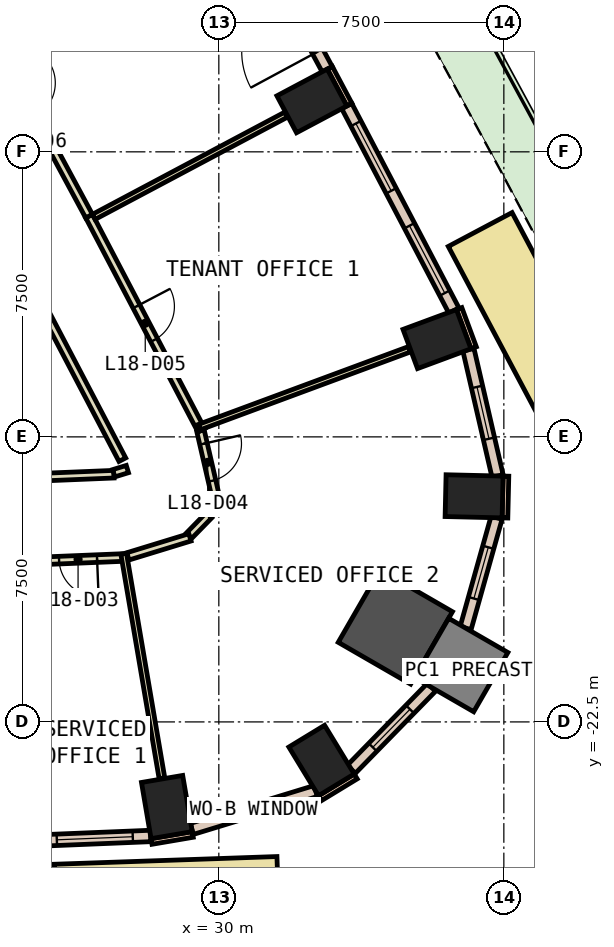
"""IFC4 building model, lengths in metres.
Left out: names, types, materials, properties, quantities, classifications, styles, units other than length and angle.
Written with IfcOpenShell. Run it as: python <this file> out.ifc"""

import sys

from ifc_helpers import new_model, si_unit, direction, frame, frame_2d, origin, origin_2d, place, context, subcontext, project, spatial, rectangle, extrude, element, fill, save


model = new_model("IFC4")
c1 = context("Model", 3, precision=1e-05, world=origin(), true_north=direction((0.0, 1.0)))
c2 = subcontext(c1, "Body", "Model", "MODEL_VIEW")
j1 = project(units=[si_unit("LENGTHUNIT", "METRE"), si_unit("PLANEANGLEUNIT", "RADIAN")], contexts=[c1])
p1 = place(None, origin())
s1 = spatial("IfcSite", under=j1, at=p1, CompositionType="ELEMENT")
p2 = place(p1, origin())
s2 = spatial("IfcBuilding", under=s1, at=p2, CompositionType="ELEMENT")
p3 = place(p2, frame((0.0, 0.0, 86.6)))
s3 = spatial("IfcBuildingStorey", under=s2, at=p3, CompositionType="ELEMENT", Elevation=86.6)
for number, where, z_axis, x_axis in (
    (1, (28.633, -24.74, 0.0), (0.0, 0.0, 1.0), (0.986, 0.168, 0.0)),
    (2, (32.703, -23.516, 0.0), (0.0, 0.0, 1.0), (0.854, 0.52, 0.0)),
):
    element("IfcColumn", number, at=place(p3, frame(where, z_axis=z_axis, x_axis=x_axis)), inside=s3, PredefinedType="COLUMN", context=c2, shape_type="SweptSolid", body=[
        extrude(rectangle(XDim=1.1, YDim=1.5, at=origin_2d()), origin(), (0.0, 0.0, 1.0), 3.8),
    ])
p4 = place(p3, frame((34.645, -20.003, 0.0), z_axis=(0.0, 0.0, 1.0), x_axis=(-0.866025403784, 0.5, 0.0)))
e3 = element("IfcColumn", 3, at=p4, inside=s3, PredefinedType="COLUMN", context=c2, shape_type="SweptSolid", body=[
    extrude(rectangle(XDim=2.2, YDim=2.2, at=origin_2d()), origin(), (0.0, 0.0, 1.0), 3.8),
])
for number, where, z_axis, x_axis in (
    (4, (36.717, -16.564, 0.0), (0.0, 0.0, 1.0), (0.023, 1.0, 0.0)),
    (5, (35.741, -12.427, 0.0), (0.0, 0.0, 1.0), (-0.347, 0.938, 0.0)),
    (6, (32.449, -6.16, 0.0), (0.0, 0.0, 1.0), (-0.469, 0.883, 0.0)),
):
    element("IfcColumn", number, at=place(p3, frame(where, z_axis=z_axis, x_axis=x_axis)), inside=s3, PredefinedType="COLUMN", context=c2, shape_type="SweptSolid", body=[
        extrude(rectangle(XDim=1.1, YDim=1.5, at=origin_2d()), origin(), (0.0, 0.0, 1.0), 3.8),
    ])
p5 = place(p3, frame((36.377, -21.003, 0.0), z_axis=(0.0, 0.0, 1.0), x_axis=(-0.866025403784, 0.5, 0.0)))
e7 = element("IfcColumn", 7, at=p5, inside=s3, PredefinedType="COLUMN", context=c2, shape_type="SweptSolid", body=[
    extrude(rectangle(XDim=1.8, YDim=1.8, at=origin_2d()), origin(), (0.0, 0.0, 1.0), 3.8),
])
p6 = place(p3, frame((36.706, -12.656, 0.0), z_axis=(0.0, 0.0, 1.0), x_axis=(-0.347205967468, 0.937788897436, 0.0)))
e8 = element("IfcWall", 8, at=p6, inside=s3, PredefinedType="STANDARD", context=c2, shape_type="SweptSolid", body=[
    extrude(rectangle(XDim=1.1, YDim=0.15, at=frame_2d((0.55, 0.0))), origin(), (0.0, 0.0, 1.0), 3.8),
])
p7 = place(p3, frame((33.436, -6.259, 0.0), z_axis=(0.0, 0.0, 1.0), x_axis=(-0.469366248657, 0.883003581319, 0.0)))
e9 = element("IfcWall", 9, at=p7, inside=s3, PredefinedType="STANDARD", context=c2, shape_type="SweptSolid", body=[
    extrude(rectangle(XDim=1.1, YDim=0.15, at=frame_2d((0.55, 0.0))), origin(), (0.0, 0.0, 1.0), 3.8),
])
p8 = place(p3, frame((28.229, -25.646, 0.0), z_axis=(0.0, 0.0, 1.0), x_axis=(0.985763338892, 0.168138751323, 0.0)))
e10 = element("IfcWall", 10, at=p8, inside=s3, PredefinedType="STANDARD", context=c2, shape_type="SweptSolid", body=[
    extrude(rectangle(XDim=1.101, YDim=0.15, at=frame_2d((0.55, 0.0))), origin(), (0.0, 0.0, 1.0), 3.8),
])
for number, where, z_axis, x_axis in (
    (11, (32.662, -24.507, 0.0), (0.0, 0.0, 1.0), (0.854, 0.52, 0.0)),
    (12, (37.529, -17.133, 0.0), (0.0, 0.0, 1.0), (0.024, 1.0, 0.0)),
):
    element("IfcWall", number, at=place(p3, frame(where, z_axis=z_axis, x_axis=x_axis)), inside=s3, PredefinedType="STANDARD", context=c2, shape_type="SweptSolid", body=[
        extrude(rectangle(XDim=1.1, YDim=0.15, at=frame_2d((0.55, 0.0))), origin(), (0.0, 0.0, 1.0), 3.8),
    ])
p9 = place(p3, frame((22.332, -25.742, 0.0), z_axis=(0.0, 0.0, 1.0), x_axis=(0.999159360905, 0.040994774244, 0.0)))
e13 = element("IfcWall", 13, at=p9, inside=s3, PredefinedType="STANDARD", context=c2, shape_type="SweptSolid", body=[
    extrude(rectangle(XDim=5.878, YDim=0.3, at=frame_2d((2.939, 0.0))), origin(), (0.0, 0.0, 1.0), 3.8),
])
p10 = place(p9, frame((0.469, 0.0, 0.9)))
e14 = element("IfcOpeningElement", 14, at=p10, cuts=e13, PredefinedType="OPENING", context=c2, shape_type="SweptSolid", body=[
    extrude(rectangle(XDim=2.0, YDim=2.6, at=frame_2d((1.0, 1.3))), frame((0.0, 0.16, 0.0), z_axis=(0.0, -1.0, 0.0), x_axis=(1.0, 0.0, 0.0)), (0.0, 0.0, 1.0), 0.32),
])
p11 = place(p9, frame((3.408, 0.0, 0.9)))
e15 = element("IfcOpeningElement", 15, at=p11, cuts=e13, PredefinedType="OPENING", context=c2, shape_type="SweptSolid", body=[
    extrude(rectangle(XDim=2.0, YDim=2.6, at=frame_2d((1.0, 1.3))), frame((0.0, 0.16, 0.0), z_axis=(0.0, -1.0, 0.0), x_axis=(1.0, 0.0, 0.0)), (0.0, 0.0, 1.0), 0.32),
])
p12 = place(p3, frame((29.288, -25.316, 0.0), z_axis=(0.0, 0.0, 1.0), x_axis=(0.956317661006, 0.292329490895, 0.0)))
e16 = element("IfcWall", 16, at=p12, inside=s3, PredefinedType="STANDARD", context=c2, shape_type="SweptSolid", body=[
    extrude(rectangle(XDim=3.41, YDim=0.3, at=frame_2d((1.705, 0.0))), origin(), (0.0, 0.0, 1.0), 3.8),
])
p13 = place(p12, frame((1.005, 0.0, 0.9)))
e17 = element("IfcOpeningElement", 17, at=p13, cuts=e16, PredefinedType="OPENING", context=c2, shape_type="SweptSolid", body=[
    extrude(rectangle(XDim=1.4, YDim=2.6, at=frame_2d((0.7, 1.3))), frame((0.0, 0.16, 0.0), z_axis=(0.0, -1.0, 0.0), x_axis=(1.0, 0.0, 0.0)), (0.0, 0.0, 1.0), 0.32),
])
p14 = place(p3, frame((33.486, -23.747, 0.0), z_axis=(0.0, 0.0, 1.0), x_axis=(0.698928244773, 0.715191798512, 0.0)))
e18 = element("IfcWall", 18, at=p14, inside=s3, PredefinedType="STANDARD", context=c2, shape_type="SweptSolid", body=[
    extrude(rectangle(XDim=3.017, YDim=0.3, at=frame_2d((1.509, 0.0))), origin(), (0.0, 0.0, 1.0), 3.8),
])
p15 = place(p14, frame((0.809, 0.0, 0.9)))
e19 = element("IfcOpeningElement", 19, at=p15, cuts=e18, PredefinedType="OPENING", context=c2, shape_type="SweptSolid", body=[
    extrude(rectangle(XDim=1.4, YDim=2.6, at=frame_2d((0.7, 1.3))), frame((0.0, 0.16, 0.0), z_axis=(0.0, -1.0, 0.0), x_axis=(1.0, 0.0, 0.0)), (0.0, 0.0, 1.0), 0.32),
])
p16 = place(p3, frame((36.494, -20.032, 0.0), z_axis=(0.0, 0.0, 1.0), x_axis=(0.270176120308, 0.962810918102, 0.0)))
e20 = element("IfcWall", 20, at=p16, inside=s3, PredefinedType="STANDARD", context=c2, shape_type="SweptSolid", body=[
    extrude(rectangle(XDim=3.017, YDim=0.3, at=frame_2d((1.509, 0.0))), origin(), (0.0, 0.0, 1.0), 3.8),
])
p17 = place(p16, frame((0.809, 0.0, 0.9)))
e21 = element("IfcOpeningElement", 21, at=p17, cuts=e20, PredefinedType="OPENING", context=c2, shape_type="SweptSolid", body=[
    extrude(rectangle(XDim=1.4, YDim=2.6, at=frame_2d((0.7, 1.3))), frame((0.0, 0.16, 0.0), z_axis=(0.0, -1.0, 0.0), x_axis=(1.0, 0.0, 0.0)), (0.0, 0.0, 1.0), 0.32),
])
p18 = place(p3, frame((37.335, -16.029, 0.0), z_axis=(0.0, 0.0, 1.0), x_axis=(-0.224859506699, 0.974391195695, 0.0)))
e22 = element("IfcWall", 22, at=p18, inside=s3, PredefinedType="STANDARD", context=c2, shape_type="SweptSolid", body=[
    extrude(rectangle(XDim=3.41, YDim=0.3, at=frame_2d((1.705, 0.0))), origin(), (0.0, 0.0, 1.0), 3.8),
])
p19 = place(p18, frame((1.005, 0.0, 0.9)))
e23 = element("IfcOpeningElement", 23, at=p19, cuts=e22, PredefinedType="OPENING", context=c2, shape_type="SweptSolid", body=[
    extrude(rectangle(XDim=1.4, YDim=2.6, at=frame_2d((0.7, 1.3))), frame((0.0, 0.16, 0.0), z_axis=(0.0, -1.0, 0.0), x_axis=(1.0, 0.0, 0.0)), (0.0, 0.0, 1.0), 0.32),
])
p20 = place(p3, frame((36.186, -11.676, 0.0), z_axis=(0.0, 0.0, 1.0), x_axis=(-0.464187178015, 0.885737130173, 0.0)))
e24 = element("IfcWall", 24, at=p20, inside=s3, PredefinedType="STANDARD", context=c2, shape_type="SweptSolid", body=[
    extrude(rectangle(XDim=6.075, YDim=0.3, at=frame_2d((3.038, 0.0))), origin(), (0.0, 0.0, 1.0), 3.8),
])
p21 = place(p20, frame((0.519, 0.0, 0.9)))
e25 = element("IfcOpeningElement", 25, at=p21, cuts=e24, PredefinedType="OPENING", context=c2, shape_type="SweptSolid", body=[
    extrude(rectangle(XDim=2.0, YDim=2.6, at=frame_2d((1.0, 1.3))), frame((0.0, 0.16, 0.0), z_axis=(0.0, -1.0, 0.0), x_axis=(1.0, 0.0, 0.0)), (0.0, 0.0, 1.0), 0.32),
])
p22 = place(p20, frame((3.556, 0.0, 0.9)))
e26 = element("IfcOpeningElement", 26, at=p22, cuts=e24, PredefinedType="OPENING", context=c2, shape_type="SweptSolid", body=[
    extrude(rectangle(XDim=2.0, YDim=2.6, at=frame_2d((1.0, 1.3))), frame((0.0, 0.16, 0.0), z_axis=(0.0, -1.0, 0.0), x_axis=(1.0, 0.0, 0.0)), (0.0, 0.0, 1.0), 0.32),
])
p23 = place(p3, frame((32.851, -5.325, 0.0), z_axis=(0.0, 0.0, 1.0), x_axis=(-0.474369552216, 0.880325807829, 0.0)))
e27 = element("IfcWall", 27, at=p23, inside=s3, PredefinedType="STANDARD", context=c2, shape_type="SweptSolid", body=[
    extrude(rectangle(XDim=6.099, YDim=0.3, at=frame_2d((3.049, 0.0))), origin(), (0.0, 0.0, 1.0), 3.8),
])
p24 = place(p23, frame((0.525, 0.0, 0.0)))
e28 = element("IfcOpeningElement", 28, at=p24, cuts=e27, PredefinedType="OPENING", context=c2, shape_type="SweptSolid", body=[
    extrude(rectangle(XDim=2.0, YDim=2.4, at=frame_2d((1.0, 1.2))), frame((0.0, 0.16, 0.0), z_axis=(0.0, -1.0, 0.0), x_axis=(1.0, 0.0, 0.0)), (0.0, 0.0, 1.0), 0.32),
])
p25 = place(p23, frame((3.574, 0.0, 0.9)))
e29 = element("IfcOpeningElement", 29, at=p25, cuts=e27, PredefinedType="OPENING", context=c2, shape_type="SweptSolid", body=[
    extrude(rectangle(XDim=2.0, YDim=2.6, at=frame_2d((1.0, 1.3))), frame((0.0, 0.16, 0.0), z_axis=(0.0, -1.0, 0.0), x_axis=(1.0, 0.0, 0.0)), (0.0, 0.0, 1.0), 0.32),
])
p26 = place(p3, frame((25.702, -27.195, 0.0), z_axis=(0.0, 0.0, 1.0), x_axis=(0.999399802094, 0.034641529615, 0.0)))
e30 = element("IfcWall", 30, at=p26, inside=s3, PredefinedType="STANDARD", context=c2, shape_type="SweptSolid", body=[
    extrude(rectangle(XDim=5.864, YDim=1.9, at=frame_2d((2.932, 0.0))), origin(), (0.0, 0.0, 1.0), 0.8),
])
p27 = place(p3, frame((39.362, -14.224, 0.0), z_axis=(0.0, 0.0, 1.0), x_axis=(-0.468973311577, 0.883212337453, 0.0)))
e31 = element("IfcWall", 31, at=p27, inside=s3, PredefinedType="STANDARD", context=c2, shape_type="SweptSolid", body=[
    extrude(rectangle(XDim=5.299, YDim=1.9, at=frame_2d((2.649, 0.0))), origin(), (0.0, 0.0, 1.0), 0.8),
])
p28 = place(p3, frame((21.446, -16.22, 0.0), z_axis=(0.0, 0.0, 1.0), x_axis=(0.999157128819, 0.041049140426, 0.0)))
e32 = element("IfcWall", 32, at=p28, inside=s3, PredefinedType="PARTITIONING", context=c2, shape_type="SweptSolid", body=[
    extrude(rectangle(XDim=5.799, YDim=0.2, at=frame_2d((2.899, 0.0))), origin(), (0.0, 0.0, 1.0), 3.8),
])
p29 = place(p3, frame((27.235, -15.957, 0.0), z_axis=(0.0, 0.0, 1.0), x_axis=(0.956017741345, 0.293308844453, 0.0)))
e33 = element("IfcWall", 33, at=p29, inside=s3, PredefinedType="PARTITIONING", context=c2, shape_type="SweptSolid", body=[
    extrude(rectangle(XDim=0.375, YDim=0.2, at=frame_2d((0.188, 0.0))), origin(), (0.0, 0.0, 1.0), 3.8),
])
p30 = place(p3, frame((27.461, -15.6, 0.0), z_axis=(0.0, 0.0, 1.0), x_axis=(-0.464203280494, 0.885728691179, 0.0)))
e34 = element("IfcWall", 34, at=p30, inside=s3, PredefinedType="PARTITIONING", context=c2, shape_type="SweptSolid", body=[
    extrude(rectangle(XDim=5.995, YDim=0.2, at=frame_2d((2.998, 0.0))), origin(), (0.0, 0.0, 1.0), 3.8),
])
p31 = place(p3, frame((27.538, -18.172, 0.0), z_axis=(0.0, 0.0, 1.0), x_axis=(-0.999161261417, -0.040948427126, 0.0)))
e35 = element("IfcWall", 35, at=p31, inside=s3, PredefinedType="PARTITIONING", context=c2, shape_type="SweptSolid", body=[
    extrude(rectangle(XDim=2.486, YDim=0.2, at=frame_2d((1.243, 0.0))), origin(), (0.0, 0.0, 1.0), 3.8),
])
p32 = place(p31, frame((0.743, 0.0, 0.0)))
e36 = element("IfcOpeningElement", 36, at=p32, cuts=e35, PredefinedType="OPENING", context=c2, shape_type="SweptSolid", body=[
    extrude(rectangle(XDim=1.0, YDim=2.1, at=frame_2d((0.5, 1.05))), frame((0.0, 0.11, 0.0), z_axis=(0.0, -1.0, 0.0), x_axis=(1.0, 0.0, 0.0)), (0.0, 0.0, 1.0), 0.22),
])
p33 = place(p3, frame((29.517, -14.838, 0.0), z_axis=(0.0, 0.0, 1.0), x_axis=(0.224316169854, -0.974516421587, 0.0)))
e37 = element("IfcWall", 37, at=p33, inside=s3, PredefinedType="PARTITIONING", context=c2, shape_type="SweptSolid", body=[
    extrude(rectangle(XDim=1.707, YDim=0.2, at=frame_2d((0.853, 0.0))), origin(), (0.0, 0.0, 1.0), 3.8),
])
p34 = place(p33, frame((0.353, 0.0, 0.0)))
e38 = element("IfcOpeningElement", 38, at=p34, cuts=e37, PredefinedType="OPENING", context=c2, shape_type="SweptSolid", body=[
    extrude(rectangle(XDim=1.0, YDim=2.1, at=frame_2d((0.5, 1.05))), frame((0.0, 0.11, 0.0), z_axis=(0.0, -1.0, 0.0), x_axis=(1.0, 0.0, 0.0)), (0.0, 0.0, 1.0), 0.22),
])
p35 = place(p3, frame((29.851, -16.5, 0.0), z_axis=(0.0, 0.0, 1.0), x_axis=(-0.269792639482, -0.962918444979, 0.0)))
e39 = element("IfcWall", 39, at=p35, inside=s3, PredefinedType="PARTITIONING", context=c2, shape_type="SweptSolid", body=[
    extrude(rectangle(XDim=0.557, YDim=0.2, at=frame_2d((0.278, 0.0))), origin(), (0.0, 0.0, 1.0), 3.8),
])
p36 = place(p3, frame((29.743, -17.061, 0.0), z_axis=(0.0, 0.0, 1.0), x_axis=(-0.698331924638, -0.715774072617, 0.0)))
e40 = element("IfcWall", 40, at=p36, inside=s3, PredefinedType="PARTITIONING", context=c2, shape_type="SweptSolid", body=[
    extrude(rectangle(XDim=0.756, YDim=0.2, at=frame_2d((0.378, 0.0))), origin(), (0.0, 0.0, 1.0), 3.8),
])
p37 = place(p3, frame((29.24, -17.644, 0.0), z_axis=(0.0, 0.0, 1.0), x_axis=(-0.956137025409, -0.292919764852, 0.0)))
e41 = element("IfcWall", 41, at=p37, inside=s3, PredefinedType="PARTITIONING", context=c2, shape_type="SweptSolid", body=[
    extrude(rectangle(XDim=1.707, YDim=0.2, at=frame_2d((0.854, 0.0))), origin(), (0.0, 0.0, 1.0), 3.8),
])
p38 = place(p3, frame((26.586, -9.191, 0.0), z_axis=(0.0, 0.0, 1.0), x_axis=(0.46422194761, -0.885718907643, 0.0)))
e42 = element("IfcWall", 42, at=p38, inside=s3, PredefinedType="PARTITIONING", context=c2, shape_type="SweptSolid", body=[
    extrude(rectangle(XDim=6.366, YDim=0.2, at=frame_2d((3.183, 0.0))), origin(), (0.0, 0.0, 1.0), 3.8),
])
p39 = place(p38, frame((2.683, 0.0, 0.0)))
e43 = element("IfcOpeningElement", 43, at=p39, cuts=e42, PredefinedType="OPENING", context=c2, shape_type="SweptSolid", body=[
    extrude(rectangle(XDim=1.0, YDim=2.1, at=frame_2d((0.5, 1.05))), frame((0.0, 0.11, 0.0), z_axis=(0.0, -1.0, 0.0), x_axis=(1.0, 0.0, 0.0)), (0.0, 0.0, 1.0), 0.22),
])
p40 = place(p3, frame((23.212, -2.932, 0.0), z_axis=(0.0, 0.0, 1.0), x_axis=(0.474404892994, -0.880306763295, 0.0)))
e44 = element("IfcWall", 44, at=p40, inside=s3, PredefinedType="PARTITIONING", context=c2, shape_type="SweptSolid", body=[
    extrude(rectangle(XDim=7.11, YDim=0.2, at=frame_2d((3.555, 0.0))), origin(), (0.0, 0.0, 1.0), 3.8),
])
p41 = place(p40, frame((3.13, 0.0, 0.0)))
e45 = element("IfcOpeningElement", 45, at=p41, cuts=e44, PredefinedType="OPENING", context=c2, shape_type="SweptSolid", body=[
    extrude(rectangle(XDim=1.0, YDim=2.1, at=frame_2d((0.5, 1.05))), frame((0.0, 0.11, 0.0), z_axis=(0.0, -1.0, 0.0), x_axis=(1.0, 0.0, 0.0)), (0.0, 0.0, 1.0), 0.22),
])
p42 = place(p3, frame((27.496, -18.074, 0.0), z_axis=(0.0, 0.0, 1.0), x_axis=(0.168025125373, -0.985782712997, 0.0)))
e46 = element("IfcWall", 46, at=p42, inside=s3, PredefinedType="PARTITIONING", context=c2, shape_type="SweptSolid", body=[
    extrude(rectangle(XDim=5.992, YDim=0.15, at=frame_2d((2.996, 0.0))), origin(), (0.0, 0.0, 1.0), 3.8),
])
p43 = place(p3, frame((29.494, -14.741, 0.0), z_axis=(0.0, 0.0, 1.0), x_axis=(0.937719767819, 0.347392626636, 0.0)))
e47 = element("IfcWall", 47, at=p43, inside=s3, PredefinedType="PARTITIONING", context=c2, shape_type="SweptSolid", body=[
    extrude(rectangle(XDim=5.892, YDim=0.15, at=frame_2d((2.946, 0.0))), origin(), (0.0, 0.0, 1.0), 3.8),
])
p44 = place(p3, frame((26.709, -9.211, 0.0), z_axis=(0.0, 0.0, 1.0), x_axis=(0.883057238515, 0.46926529118, 0.0)))
e48 = element("IfcWall", 48, at=p44, inside=s3, PredefinedType="PARTITIONING", context=c2, shape_type="SweptSolid", body=[
    extrude(rectangle(XDim=5.73, YDim=0.15, at=frame_2d((2.865, 0.0))), origin(), (0.0, 0.0, 1.0), 3.8),
])
p45 = place(p11, origin())
e49 = element("IfcWindow", 49, at=p45, inside=s3, PartitioningType="SINGLE_PANEL", PredefinedType="WINDOW", context=c2, shape_type="SweptSolid", body=[
    extrude(rectangle(XDim=2.0, YDim=2.6, at=frame_2d((1.0, 1.3))), frame((0.0, 0.03, 0.0), z_axis=(0.0, -1.0, 0.0), x_axis=(1.0, 0.0, 0.0)), (0.0, 0.0, 1.0), 0.06),
])
fill(e15, e49)
p46 = place(p13, origin())
e50 = element("IfcWindow", 50, at=p46, inside=s3, PartitioningType="SINGLE_PANEL", PredefinedType="WINDOW", context=c2, shape_type="SweptSolid", body=[
    extrude(rectangle(XDim=1.4, YDim=2.6, at=frame_2d((0.7, 1.3))), frame((0.0, 0.03, 0.0), z_axis=(0.0, -1.0, 0.0), x_axis=(1.0, 0.0, 0.0)), (0.0, 0.0, 1.0), 0.06),
])
fill(e17, e50)
p47 = place(p15, origin())
e51 = element("IfcWindow", 51, at=p47, inside=s3, PartitioningType="SINGLE_PANEL", PredefinedType="WINDOW", context=c2, shape_type="SweptSolid", body=[
    extrude(rectangle(XDim=1.4, YDim=2.6, at=frame_2d((0.7, 1.3))), frame((0.0, 0.03, 0.0), z_axis=(0.0, -1.0, 0.0), x_axis=(1.0, 0.0, 0.0)), (0.0, 0.0, 1.0), 0.06),
])
fill(e19, e51)
p48 = place(p17, origin())
e52 = element("IfcWindow", 52, at=p48, inside=s3, PartitioningType="SINGLE_PANEL", PredefinedType="WINDOW", context=c2, shape_type="SweptSolid", body=[
    extrude(rectangle(XDim=1.4, YDim=2.6, at=frame_2d((0.7, 1.3))), frame((0.0, 0.03, 0.0), z_axis=(0.0, -1.0, 0.0), x_axis=(1.0, 0.0, 0.0)), (0.0, 0.0, 1.0), 0.06),
])
fill(e21, e52)
p49 = place(p19, origin())
e53 = element("IfcWindow", 53, at=p49, inside=s3, PartitioningType="SINGLE_PANEL", PredefinedType="WINDOW", context=c2, shape_type="SweptSolid", body=[
    extrude(rectangle(XDim=1.4, YDim=2.6, at=frame_2d((0.7, 1.3))), frame((0.0, 0.03, 0.0), z_axis=(0.0, -1.0, 0.0), x_axis=(1.0, 0.0, 0.0)), (0.0, 0.0, 1.0), 0.06),
])
fill(e23, e53)
p50 = place(p21, origin())
e54 = element("IfcWindow", 54, at=p50, inside=s3, PartitioningType="SINGLE_PANEL", PredefinedType="WINDOW", context=c2, shape_type="SweptSolid", body=[
    extrude(rectangle(XDim=2.0, YDim=2.6, at=frame_2d((1.0, 1.3))), frame((0.0, 0.03, 0.0), z_axis=(0.0, -1.0, 0.0), x_axis=(1.0, 0.0, 0.0)), (0.0, 0.0, 1.0), 0.06),
])
fill(e25, e54)
p51 = place(p22, origin())
e55 = element("IfcWindow", 55, at=p51, inside=s3, PartitioningType="SINGLE_PANEL", PredefinedType="WINDOW", context=c2, shape_type="SweptSolid", body=[
    extrude(rectangle(XDim=2.0, YDim=2.6, at=frame_2d((1.0, 1.3))), frame((0.0, 0.03, 0.0), z_axis=(0.0, -1.0, 0.0), x_axis=(1.0, 0.0, 0.0)), (0.0, 0.0, 1.0), 0.06),
])
fill(e26, e55)
p52 = place(p32, origin())
e56 = element("IfcDoor", 56, at=p52, inside=s3, OperationType="SINGLE_SWING_LEFT", PredefinedType="DOOR", context=c2, shape_type="SweptSolid", body=[
    extrude(rectangle(XDim=1.0, YDim=2.1, at=frame_2d((0.5, 1.05))), frame((0.0, 0.025, 0.0), z_axis=(0.0, -1.0, 0.0), x_axis=(1.0, 0.0, 0.0)), (0.0, 0.0, 1.0), 0.05),
])
fill(e36, e56)
p53 = place(p34, origin())
e57 = element("IfcDoor", 57, at=p53, inside=s3, OperationType="SINGLE_SWING_RIGHT", PredefinedType="DOOR", context=c2, shape_type="SweptSolid", body=[
    extrude(rectangle(XDim=1.0, YDim=2.1, at=frame_2d((0.5, 1.05))), frame((0.0, 0.025, 0.0), z_axis=(0.0, -1.0, 0.0), x_axis=(1.0, 0.0, 0.0)), (0.0, 0.0, 1.0), 0.05),
])
fill(e38, e57)
p54 = place(p39, origin())
e58 = element("IfcDoor", 58, at=p54, inside=s3, OperationType="SINGLE_SWING_LEFT", PredefinedType="DOOR", context=c2, shape_type="SweptSolid", body=[
    extrude(rectangle(XDim=1.0, YDim=2.1, at=frame_2d((0.5, 1.05))), frame((0.0, 0.025, 0.0), z_axis=(0.0, -1.0, 0.0), x_axis=(1.0, 0.0, 0.0)), (0.0, 0.0, 1.0), 0.05),
])
fill(e43, e58)
save(model, sys.argv[1])
